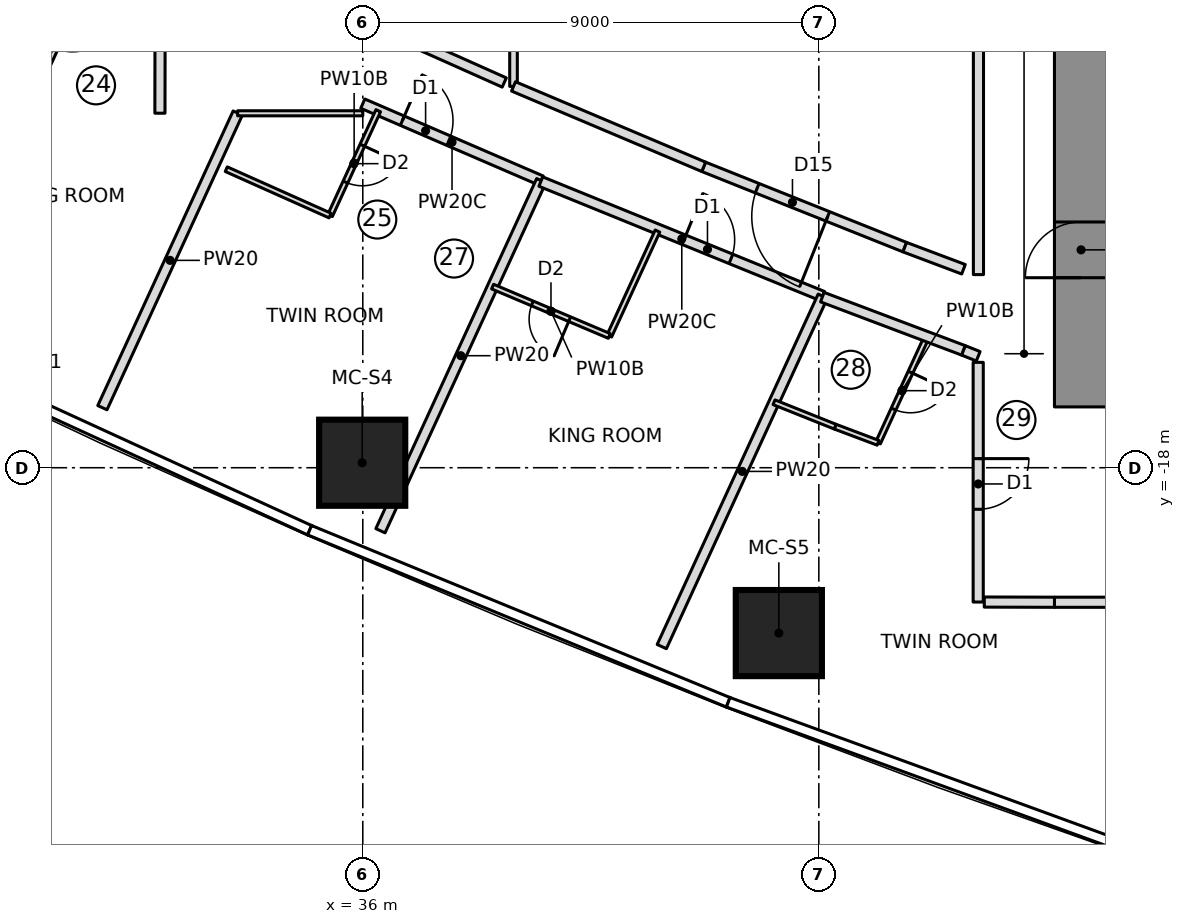
"""IFC4 building model, lengths in metres.
Left out: names, types, materials, properties, quantities, classifications, styles, units other than length and angle.
Written with IfcOpenShell. Run it as: python <this file> out.ifc"""

import sys

from ifc_helpers import new_model, si_unit, direction, frame, frame_2d, origin, origin_2d, place, context, subcontext, project, spatial, rectangle, extrude, element, fill, save


model = new_model("IFC4")
c1 = context("Model", 3, precision=1e-05, world=origin(), true_north=direction((0.0, 1.0)))
c2 = subcontext(c1, "Body", "Model", "MODEL_VIEW")
j1 = project(units=[si_unit("LENGTHUNIT", "METRE"), si_unit("PLANEANGLEUNIT", "RADIAN")], contexts=[c1])
p1 = place(None, origin())
s1 = spatial("IfcSite", under=j1, at=p1, CompositionType="ELEMENT")
p2 = place(p1, origin())
s2 = spatial("IfcBuilding", under=s1, at=p2, CompositionType="ELEMENT")
p3 = place(p2, frame((0.0, 0.0, 102.65)))
s3 = spatial("IfcBuildingStorey", under=s2, at=p3, CompositionType="ELEMENT", Elevation=102.65)
p4 = place(p3, frame((50.175, -16.8, 0.0), z_axis=(0.0, 0.0, 1.0), x_axis=(0.0, 1.0, 0.0)))
e1 = element("IfcWall", 1, at=p4, inside=s3, PredefinedType="SHEAR", context=c2, shape_type="SweptSolid", body=[
    extrude(rectangle(XDim=10.15, YDim=1.05, at=frame_2d((5.075, 0.0))), origin(), (0.0, 0.0, 1.0), 3.55),
])
p5 = place(p4, frame((2.55, 0.0, 0.0)))
e2 = element("IfcOpeningElement", 2, at=p5, cuts=e1, PredefinedType="OPENING", context=c2, shape_type="SweptSolid", body=[
    extrude(rectangle(XDim=1.1, YDim=2.1, at=frame_2d((0.55, 1.05))), frame((0.0, 0.535, 0.0), z_axis=(0.0, -1.0, 0.0), x_axis=(1.0, 0.0, 0.0)), (0.0, 0.0, 1.0), 1.07),
])
for number, where, z_axis, x_axis in (
    (3, (35.988, -17.902, 0.0), (0.0, 0.0, 1.0), (1.0, 0.0, 0.0)),
    (4, (44.211, -21.264, 0.0), (0.0, 0.0, 1.0), (1.0, 0.0, 0.0)),
):
    element("IfcColumn", number, at=place(p3, frame(where, z_axis=z_axis, x_axis=x_axis)), inside=s3, PredefinedType="COLUMN", context=c2, shape_type="SweptSolid", body=[
        extrude(rectangle(XDim=1.7, YDim=1.7, at=origin_2d()), origin(), (0.0, 0.0, 1.0), 3.55),
    ])
p6 = place(p3, frame((30.586, -8.31, 0.0), z_axis=(0.0, 0.0, 1.0), x_axis=(-0.417466676952, -0.908692232626, 0.0)))
e5 = element("IfcWall", 5, at=p6, inside=s3, PredefinedType="PARTITIONING", context=c2, shape_type="SweptSolid", body=[
    extrude(rectangle(XDim=2.277, YDim=0.1, at=frame_2d((1.139, 0.0))), origin(), (0.0, 0.0, 1.0), 3.25),
])
p7 = place(p6, frame((0.75, 0.0, 0.0)))
e6 = element("IfcOpeningElement", 6, at=p7, cuts=e5, PredefinedType="OPENING", context=c2, shape_type="SweptSolid", body=[
    extrude(rectangle(XDim=0.8, YDim=2.1, at=frame_2d((0.4, 1.05))), frame((0.0, 0.06, 0.0), z_axis=(0.0, -1.0, 0.0), x_axis=(1.0, 0.0, 0.0)), (0.0, 0.0, 1.0), 0.12),
])
p8 = place(p3, frame((30.861, -16.815, 0.0), z_axis=(0.0, 0.0, 1.0), x_axis=(0.417441426461, 0.908703832651, 0.0)))
e7 = element("IfcWall", 7, at=p8, inside=s3, PredefinedType="PARTITIONING", context=c2, shape_type="SweptSolid", body=[
    extrude(rectangle(XDim=6.399, YDim=0.2, at=frame_2d((3.2, 0.0))), origin(), (0.0, 0.0, 1.0), 3.25),
])
p9 = place(p3, frame((36.0, -10.815, 0.0), z_axis=(0.0, 0.0, 1.0), x_axis=(0.918174446699, -0.396176331233, 0.0)))
e8 = element("IfcWall", 8, at=p9, inside=s3, PredefinedType="PARTITIONING", context=c2, shape_type="SweptSolid", body=[
    extrude(rectangle(XDim=3.836, YDim=0.2, at=frame_2d((1.918, 0.0))), origin(), (0.0, 0.0, 1.0), 3.25),
])
p10 = place(p9, frame((0.85, 0.0, 0.0)))
e9 = element("IfcOpeningElement", 9, at=p10, cuts=e8, PredefinedType="OPENING", context=c2, shape_type="SweptSolid", body=[
    extrude(rectangle(XDim=1.0, YDim=2.1, at=frame_2d((0.5, 1.05))), frame((0.0, 0.11, 0.0), z_axis=(0.0, -1.0, 0.0), x_axis=(1.0, 0.0, 0.0)), (0.0, 0.0, 1.0), 0.22),
])
p11 = place(p3, frame((36.305, -10.954, 0.0), z_axis=(0.0, 0.0, 1.0), x_axis=(-0.41750734959, -0.908673545911, 0.0)))
e10 = element("IfcWall", 10, at=p11, inside=s3, PredefinedType="PARTITIONING", context=c2, shape_type="SweptSolid", body=[
    extrude(rectangle(XDim=2.277, YDim=0.1, at=frame_2d((1.139, 0.0))), origin(), (0.0, 0.0, 1.0), 3.25),
])
p12 = place(p11, frame((0.75, 0.0, 0.0)))
e11 = element("IfcOpeningElement", 11, at=p12, cuts=e10, PredefinedType="OPENING", context=c2, shape_type="SweptSolid", body=[
    extrude(rectangle(XDim=0.8, YDim=2.1, at=frame_2d((0.4, 1.05))), frame((0.0, 0.06, 0.0), z_axis=(0.0, -1.0, 0.0), x_axis=(1.0, 0.0, 0.0)), (0.0, 0.0, 1.0), 0.12),
])
p13 = place(p3, frame((35.354, -13.023, 0.0), z_axis=(0.0, 0.0, 1.0), x_axis=(-0.913060453705, 0.407824236504, 0.0)))
e12 = element("IfcWall", 12, at=p13, inside=s3, PredefinedType="PARTITIONING", context=c2, shape_type="SweptSolid", body=[
    extrude(rectangle(XDim=2.243, YDim=0.1, at=frame_2d((1.122, 0.0))), origin(), (0.0, 0.0, 1.0), 3.25),
])
p14 = place(p3, frame((36.348, -19.244, 0.0), z_axis=(0.0, 0.0, 1.0), x_axis=(0.417442847913, 0.908703179661, 0.0)))
e13 = element("IfcWall", 13, at=p14, inside=s3, PredefinedType="PARTITIONING", context=c2, shape_type="SweptSolid", body=[
    extrude(rectangle(XDim=7.604, YDim=0.2, at=frame_2d((3.802, 0.0))), origin(), (0.0, 0.0, 1.0), 3.25),
])
p15 = place(p3, frame((39.514, -12.353, 0.0), z_axis=(0.0, 0.0, 1.0), x_axis=(0.926327862679, -0.376718317613, 0.0)))
e14 = element("IfcWall", 14, at=p15, inside=s3, PredefinedType="PARTITIONING", context=c2, shape_type="SweptSolid", body=[
    extrude(rectangle(XDim=6.006, YDim=0.2, at=frame_2d((3.003, 0.0))), origin(), (0.0, 0.0, 1.0), 3.25),
])
p16 = place(p15, frame((3.05, 0.0, 0.0)))
e15 = element("IfcOpeningElement", 15, at=p16, cuts=e14, PredefinedType="OPENING", context=c2, shape_type="SweptSolid", body=[
    extrude(rectangle(XDim=1.0, YDim=2.1, at=frame_2d((0.5, 1.05))), frame((0.0, 0.11, 0.0), z_axis=(0.0, -1.0, 0.0), x_axis=(1.0, 0.0, 0.0)), (0.0, 0.0, 1.0), 0.22),
])
p17 = place(p3, frame((41.816, -13.33, 0.0), z_axis=(0.0, 0.0, 1.0), x_axis=(-0.417433204355, -0.908707609686, 0.0)))
e16 = element("IfcWall", 16, at=p17, inside=s3, PredefinedType="PARTITIONING", context=c2, shape_type="SweptSolid", body=[
    extrude(rectangle(XDim=2.278, YDim=0.1, at=frame_2d((1.139, 0.0))), origin(), (0.0, 0.0, 1.0), 3.25),
])
p18 = place(p3, frame((40.865, -15.4, 0.0), z_axis=(0.0, 0.0, 1.0), x_axis=(-0.921042675983, 0.38946166566, 0.0)))
e17 = element("IfcWall", 17, at=p18, inside=s3, PredefinedType="PARTITIONING", context=c2, shape_type="SweptSolid", body=[
    extrude(rectangle(XDim=2.501, YDim=0.1, at=frame_2d((1.25, 0.0))), origin(), (0.0, 0.0, 1.0), 3.25),
])
p19 = place(p18, frame((0.85, 0.0, 0.0)))
e18 = element("IfcOpeningElement", 18, at=p19, cuts=e17, PredefinedType="OPENING", context=c2, shape_type="SweptSolid", body=[
    extrude(rectangle(XDim=0.8, YDim=2.1, at=frame_2d((0.4, 1.05))), frame((0.0, 0.06, 0.0), z_axis=(0.0, -1.0, 0.0), x_axis=(1.0, 0.0, 0.0)), (0.0, 0.0, 1.0), 0.12),
])
p20 = place(p3, frame((41.901, -21.53, 0.0), z_axis=(0.0, 0.0, 1.0), x_axis=(0.417427858403, 0.908710065438, 0.0)))
e19 = element("IfcWall", 19, at=p20, inside=s3, PredefinedType="PARTITIONING", context=c2, shape_type="SweptSolid", body=[
    extrude(rectangle(XDim=7.61, YDim=0.2, at=frame_2d((3.805, 0.0))), origin(), (0.0, 0.0, 1.0), 3.25),
])
p21 = place(p3, frame((47.122, -15.434, 0.0), z_axis=(0.0, 0.0, 1.0), x_axis=(-0.417409478396, -0.90871850831, 0.0)))
e20 = element("IfcWall", 20, at=p21, inside=s3, PredefinedType="PARTITIONING", context=c2, shape_type="SweptSolid", body=[
    extrude(rectangle(XDim=2.283, YDim=0.1, at=frame_2d((1.142, 0.0))), origin(), (0.0, 0.0, 1.0), 3.25),
])
p22 = place(p21, frame((0.75, 0.0, 0.0)))
e21 = element("IfcOpeningElement", 21, at=p22, cuts=e20, PredefinedType="OPENING", context=c2, shape_type="SweptSolid", body=[
    extrude(rectangle(XDim=0.8, YDim=2.1, at=frame_2d((0.4, 1.05))), frame((0.0, 0.06, 0.0), z_axis=(0.0, -1.0, 0.0), x_axis=(1.0, 0.0, 0.0)), (0.0, 0.0, 1.0), 0.12),
])
p23 = place(p3, frame((46.169, -17.509, 0.0), z_axis=(0.0, 0.0, 1.0), x_axis=(-0.935885332459, 0.352304760808, 0.0)))
e22 = element("IfcWall", 22, at=p23, inside=s3, PredefinedType="PARTITIONING", context=c2, shape_type="SweptSolid", body=[
    extrude(rectangle(XDim=0.906, YDim=0.1, at=frame_2d((0.453, 0.0))), origin(), (0.0, 0.0, 1.0), 3.25),
])
p24 = place(p3, frame((45.321, -17.19, 0.0), z_axis=(0.0, 0.0, 1.0), x_axis=(-0.928593389657, 0.371098796393, 0.0)))
e23 = element("IfcWall", 23, at=p24, inside=s3, PredefinedType="PARTITIONING", context=c2, shape_type="SweptSolid", body=[
    extrude(rectangle(XDim=1.298, YDim=0.1, at=frame_2d((0.649, 0.0))), origin(), (0.0, 0.0, 1.0), 3.25),
])
p25 = place(p3, frame((38.792, -10.397, 0.0), z_axis=(0.0, 0.0, 1.0), x_axis=(-0.913029587861, 0.407893333716, 0.0)))
e24 = element("IfcWall", 24, at=p25, inside=s3, PredefinedType="PARTITIONING", context=c2, shape_type="SweptSolid", body=[
    extrude(rectangle(XDim=3.058, YDim=0.2, at=frame_2d((1.529, 0.0))), origin(), (0.0, 0.0, 1.0), 3.25),
])
p26 = place(p3, frame((38.975, -10.474, 0.0), z_axis=(0.0, 0.0, 1.0), x_axis=(0.0, 1.0, 0.0)))
e25 = element("IfcWall", 25, at=p26, inside=s3, PredefinedType="PARTITIONING", context=c2, shape_type="SweptSolid", body=[
    extrude(rectangle(XDim=20.949, YDim=0.15, at=frame_2d((10.474, 0.0))), origin(), (0.0, 0.0, 1.0), 3.25),
])
p27 = place(p3, frame((46.696, -13.647, 0.0), z_axis=(0.0, 0.0, 1.0), x_axis=(-0.928638161177, 0.370986745864, 0.0)))
e26 = element("IfcWall", 26, at=p27, inside=s3, PredefinedType="PARTITIONING", context=c2, shape_type="SweptSolid", body=[
    extrude(rectangle(XDim=4.273, YDim=0.2, at=frame_2d((2.136, 0.0))), origin(), (0.0, 0.0, 1.0), 3.25),
])
p28 = place(p27, frame((1.636, 0.0, 0.0)))
e27 = element("IfcOpeningElement", 27, at=p28, cuts=e26, PredefinedType="OPENING", context=c2, shape_type="SweptSolid", body=[
    extrude(rectangle(XDim=1.5, YDim=2.1, at=frame_2d((0.75, 1.05))), frame((0.0, 0.11, 0.0), z_axis=(0.0, -1.0, 0.0), x_axis=(1.0, 0.0, 0.0)), (0.0, 0.0, 1.0), 0.22),
])
p29 = place(p3, frame((42.728, -12.062, 0.0), z_axis=(0.0, 0.0, 1.0), x_axis=(-0.921030909625, 0.389489490891, 0.0)))
e28 = element("IfcWall", 28, at=p29, inside=s3, PredefinedType="PARTITIONING", context=c2, shape_type="SweptSolid", body=[
    extrude(rectangle(XDim=4.075, YDim=0.2, at=frame_2d((2.038, 0.0))), origin(), (0.0, 0.0, 1.0), 3.25),
])
p30 = place(p3, frame((49.65, -20.655, 0.0), z_axis=(0.0, 0.0, 1.0), x_axis=(1.0, 0.0, 0.0)))
e29 = element("IfcWall", 29, at=p30, inside=s3, PredefinedType="PARTITIONING", context=c2, shape_type="SweptSolid", body=[
    extrude(rectangle(XDim=4.976, YDim=0.2, at=frame_2d((2.488, 0.0))), origin(), (0.0, 0.0, 1.0), 3.25),
])
p31 = place(p30, frame((1.988, 0.0, 0.0)))
e30 = element("IfcOpeningElement", 30, at=p31, cuts=e29, PredefinedType="OPENING", context=c2, shape_type="SweptSolid", body=[
    extrude(rectangle(XDim=1.5, YDim=2.1, at=frame_2d((0.75, 1.05))), frame((0.0, 0.11, 0.0), z_axis=(0.0, -1.0, 0.0), x_axis=(1.0, 0.0, 0.0)), (0.0, 0.0, 1.0), 0.22),
])
p32 = place(p3, frame((33.53, -11.005, 0.0), z_axis=(0.0, 0.0, 1.0), x_axis=(1.0, 0.0, 0.0)))
e31 = element("IfcWall", 31, at=p32, inside=s3, PredefinedType="PARTITIONING", context=c2, shape_type="SweptSolid", body=[
    extrude(rectangle(XDim=2.47, YDim=0.1, at=frame_2d((1.235, 0.0))), origin(), (0.0, 0.0, 1.0), 3.25),
])
p33 = place(p3, frame((45.069, -14.634, 0.0), z_axis=(0.0, 0.0, 1.0), x_axis=(0.93564003724, -0.352955692282, 0.0)))
e32 = element("IfcWall", 32, at=p33, inside=s3, PredefinedType="PARTITIONING", context=c2, shape_type="SweptSolid", body=[
    extrude(rectangle(XDim=2.978, YDim=0.2, at=frame_2d((1.489, 0.0))), origin(), (0.0, 0.0, 1.0), 3.25),
])
p34 = place(p3, frame((47.855, -14.083, 0.0), z_axis=(0.0, 0.0, 1.0), x_axis=(-0.935907269358, 0.352246480696, 0.0)))
e33 = element("IfcWall", 33, at=p34, inside=s3, PredefinedType="PARTITIONING", context=c2, shape_type="SweptSolid", body=[
    extrude(rectangle(XDim=1.239, YDim=0.2, at=frame_2d((0.619, 0.0))), origin(), (0.0, 0.0, 1.0), 3.25),
])
p35 = place(p3, frame((48.15, 14.189, 0.0), z_axis=(0.0, 0.0, 1.0), x_axis=(0.0, -1.0, 0.0)))
e34 = element("IfcWall", 34, at=p35, inside=s3, PredefinedType="PARTITIONING", context=c2, shape_type="SweptSolid", body=[
    extrude(rectangle(XDim=28.377, YDim=0.2, at=frame_2d((14.189, 0.0))), origin(), (0.0, 0.0, 1.0), 3.25),
])
p36 = place(p3, frame((32.0, -8.951, 0.0), z_axis=(0.0, 0.0, 1.0), x_axis=(-0.001665276625, -0.999998613426, 0.0)))
e35 = element("IfcWall", 35, at=p36, inside=s3, PredefinedType="PARTITIONING", context=c2, shape_type="SweptSolid", body=[
    extrude(rectangle(XDim=2.052, YDim=0.2, at=frame_2d((1.026, 0.0))), origin(), (0.0, 0.0, 1.0), 3.25),
])
p37 = place(p3, frame((47.855, -15.685, 0.0), z_axis=(0.0, 0.0, 1.0), x_axis=(0.928638194287, -0.370986662983, 0.0)))
e36 = element("IfcWall", 36, at=p37, inside=s3, PredefinedType="PARTITIONING", context=c2, shape_type="SweptSolid", body=[
    extrude(rectangle(XDim=0.312, YDim=0.2, at=frame_2d((0.156, 0.0))), origin(), (0.0, 0.0, 1.0), 3.25),
])
p38 = place(p3, frame((48.145, -15.92, 0.0), z_axis=(0.0, 0.0, 1.0), x_axis=(-5.1610239e-05, -0.999999998668, 0.0)))
e37 = element("IfcWall", 37, at=p38, inside=s3, PredefinedType="PARTITIONING", context=c2, shape_type="SweptSolid", body=[
    extrude(rectangle(XDim=4.73, YDim=0.2, at=frame_2d((2.365, 0.0))), origin(), (0.0, 0.0, 1.0), 3.25),
])
p39 = place(p38, frame((1.9, 0.0, 0.0)))
e38 = element("IfcOpeningElement", 38, at=p39, cuts=e37, PredefinedType="OPENING", context=c2, shape_type="SweptSolid", body=[
    extrude(rectangle(XDim=1.0, YDim=2.1, at=frame_2d((0.5, 1.05))), frame((0.0, 0.11, 0.0), z_axis=(0.0, -1.0, 0.0), x_axis=(1.0, 0.0, 0.0)), (0.0, 0.0, 1.0), 0.22),
])
p40 = place(p3, frame((48.265, -20.651, 0.0), z_axis=(0.0, 0.0, 1.0), x_axis=(0.999996503144, -0.002644560569, 0.0)))
e39 = element("IfcWall", 39, at=p40, inside=s3, PredefinedType="PARTITIONING", context=c2, shape_type="SweptSolid", body=[
    extrude(rectangle(XDim=1.385, YDim=0.2, at=frame_2d((0.692, 0.0))), origin(), (0.0, 0.0, 1.0), 3.25),
])
p41 = place(p12, origin())
e40 = element("IfcDoor", 40, at=p41, inside=s3, OperationType="SINGLE_SWING_LEFT", PredefinedType="DOOR", context=c2, shape_type="SweptSolid", body=[
    extrude(rectangle(XDim=0.8, YDim=2.1, at=frame_2d((0.4, 1.05))), frame((0.0, 0.025, 0.0), z_axis=(0.0, -1.0, 0.0), x_axis=(1.0, 0.0, 0.0)), (0.0, 0.0, 1.0), 0.05),
])
fill(e11, e40)
p42 = place(p10, origin())
e41 = element("IfcDoor", 41, at=p42, inside=s3, OperationType="SINGLE_SWING_LEFT", PredefinedType="DOOR", context=c2, shape_type="SweptSolid", body=[
    extrude(rectangle(XDim=1.0, YDim=2.1, at=frame_2d((0.5, 1.05))), frame((0.0, 0.025, 0.0), z_axis=(0.0, -1.0, 0.0), x_axis=(1.0, 0.0, 0.0)), (0.0, 0.0, 1.0), 0.05),
])
fill(e9, e41)
p43 = place(p19, origin())
e42 = element("IfcDoor", 42, at=p43, inside=s3, OperationType="SINGLE_SWING_LEFT", PredefinedType="DOOR", context=c2, shape_type="SweptSolid", body=[
    extrude(rectangle(XDim=0.8, YDim=2.1, at=frame_2d((0.4, 1.05))), frame((0.0, 0.025, 0.0), z_axis=(0.0, -1.0, 0.0), x_axis=(1.0, 0.0, 0.0)), (0.0, 0.0, 1.0), 0.05),
])
fill(e18, e42)
p44 = place(p16, origin())
e43 = element("IfcDoor", 43, at=p44, inside=s3, OperationType="SINGLE_SWING_LEFT", PredefinedType="DOOR", context=c2, shape_type="SweptSolid", body=[
    extrude(rectangle(XDim=1.0, YDim=2.1, at=frame_2d((0.5, 1.05))), frame((0.0, 0.025, 0.0), z_axis=(0.0, -1.0, 0.0), x_axis=(1.0, 0.0, 0.0)), (0.0, 0.0, 1.0), 0.05),
])
fill(e15, e43)
p45 = place(p22, origin())
e44 = element("IfcDoor", 44, at=p45, inside=s3, OperationType="SINGLE_SWING_LEFT", PredefinedType="DOOR", context=c2, shape_type="SweptSolid", body=[
    extrude(rectangle(XDim=0.8, YDim=2.1, at=frame_2d((0.4, 1.05))), frame((0.0, 0.025, 0.0), z_axis=(0.0, -1.0, 0.0), x_axis=(1.0, 0.0, 0.0)), (0.0, 0.0, 1.0), 0.05),
])
fill(e21, e44)
p46 = place(p28, origin())
e45 = element("IfcDoor", 45, at=p46, inside=s3, OperationType="DOUBLE_DOOR_SINGLE_SWING", PredefinedType="DOOR", context=c2, shape_type="SweptSolid", body=[
    extrude(rectangle(XDim=1.5, YDim=2.1, at=frame_2d((0.75, 1.05))), frame((0.0, 0.025, 0.0), z_axis=(0.0, -1.0, 0.0), x_axis=(1.0, 0.0, 0.0)), (0.0, 0.0, 1.0), 0.05),
])
fill(e27, e45)
p47 = place(p39, origin())
e46 = element("IfcDoor", 46, at=p47, inside=s3, OperationType="SINGLE_SWING_LEFT", PredefinedType="DOOR", context=c2, shape_type="SweptSolid", body=[
    extrude(rectangle(XDim=1.0, YDim=2.1, at=frame_2d((0.5, 1.05))), frame((0.0, 0.025, 0.0), z_axis=(0.0, -1.0, 0.0), x_axis=(1.0, 0.0, 0.0)), (0.0, 0.0, 1.0), 0.05),
])
fill(e38, e46)
p48 = place(p5, origin())
e47 = element("IfcDoor", 47, at=p48, inside=s3, OperationType="SINGLE_SWING_RIGHT", PredefinedType="DOOR", context=c2, shape_type="SweptSolid", body=[
    extrude(rectangle(XDim=1.1, YDim=2.1, at=frame_2d((0.55, 1.05))), frame((0.0, 0.025, 0.0), z_axis=(0.0, -1.0, 0.0), x_axis=(1.0, 0.0, 0.0)), (0.0, 0.0, 1.0), 0.05),
])
fill(e2, e47)
save(model, sys.argv[1])
